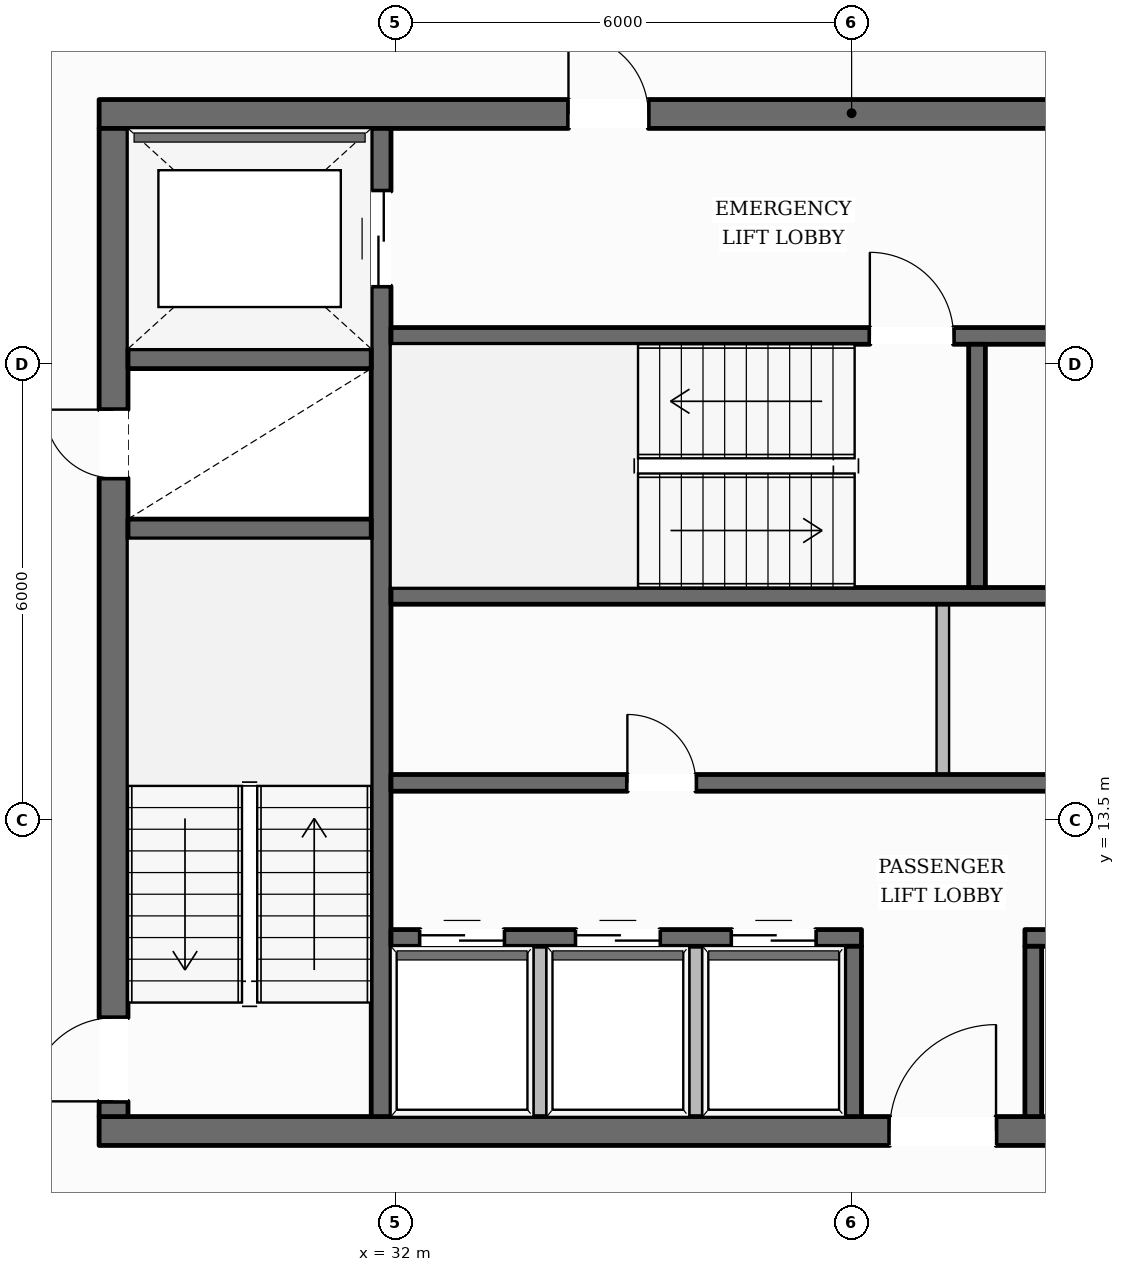
"""IFC4 building model, lengths in metres.
Left out: names, types, materials, properties, quantities, classifications, styles, units other than length and angle.
Written with IfcOpenShell. Run it as: python <this file> out.ifc"""

import sys

from ifc_helpers import new_model, si_unit, direction, frame, frame_2d, origin, place, context, subcontext, project, spatial, rectangle, extrude, element, fill, save


model = new_model("IFC4")
c1 = context("Model", 3, precision=1e-05, world=origin(), true_north=direction((0.0, 1.0)))
c2 = subcontext(c1, "Body", "Model", "MODEL_VIEW")
j1 = project(units=[si_unit("LENGTHUNIT", "METRE"), si_unit("PLANEANGLEUNIT", "RADIAN")], contexts=[c1])
p1 = place(None, origin())
s1 = spatial("IfcSite", under=j1, at=p1, CompositionType="ELEMENT")
p2 = place(p1, origin())
s2 = spatial("IfcBuilding", under=s1, at=p2, CompositionType="ELEMENT")
p3 = place(p2, frame((0.0, 0.0, 258.75)))
s3 = spatial("IfcBuildingStorey", under=s2, at=p3, CompositionType="ELEMENT", Elevation=258.75)
p4 = place(p3, frame((28.1, 9.41, 0.0), z_axis=(0.0, 0.0, 1.0), x_axis=(1.0, 0.0, 0.0)))
e1 = element("IfcWall", 1, at=p4, inside=s3, PredefinedType="SOLIDWALL", context=c2, shape_type="SweptSolid", body=[
    extrude(rectangle(XDim=19.8, YDim=0.38, at=frame_2d((9.9, 0.0))), origin(), (0.0, 0.0, 1.0), 3.61),
])
p5 = place(p4, frame((10.4, 0.0, 0.0)))
e2 = element("IfcOpeningElement", 2, at=p5, cuts=e1, PredefinedType="OPENING", context=c2, shape_type="SweptSolid", body=[
    extrude(rectangle(XDim=1.4, YDim=2.2, at=frame_2d((0.7, 1.1))), frame((0.0, 0.2, 0.0), z_axis=(0.0, -1.0, 0.0), x_axis=(1.0, 0.0, 0.0)), (0.0, 0.0, 1.0), 0.4),
])
p6 = place(p3, frame((28.1, 22.79, 0.0), z_axis=(0.0, 0.0, 1.0), x_axis=(1.0, 0.0, 0.0)))
e3 = element("IfcWall", 3, at=p6, inside=s3, PredefinedType="SOLIDWALL", context=c2, shape_type="SweptSolid", body=[
    extrude(rectangle(XDim=19.8, YDim=0.38, at=frame_2d((9.9, 0.0))), origin(), (0.0, 0.0, 1.0), 3.61),
])
p7 = place(p6, frame((6.175, 0.0, 0.0)))
e4 = element("IfcOpeningElement", 4, at=p7, cuts=e3, PredefinedType="OPENING", context=c2, shape_type="SweptSolid", body=[
    extrude(rectangle(XDim=1.05, YDim=2.15, at=frame_2d((0.525, 1.075))), frame((0.0, 0.2, 0.0), z_axis=(0.0, -1.0, 0.0), x_axis=(1.0, 0.0, 0.0)), (0.0, 0.0, 1.0), 0.4),
])
p8 = place(p6, frame((12.575, 0.0, 0.0)))
e5 = element("IfcOpeningElement", 5, at=p8, cuts=e3, PredefinedType="OPENING", context=c2, shape_type="SweptSolid", body=[
    extrude(rectangle(XDim=1.05, YDim=2.15, at=frame_2d((0.525, 1.075))), frame((0.0, 0.2, 0.0), z_axis=(0.0, -1.0, 0.0), x_axis=(1.0, 0.0, 0.0)), (0.0, 0.0, 1.0), 0.4),
])
p9 = place(p3, frame((28.29, 9.6, 0.0), z_axis=(0.0, 0.0, 1.0), x_axis=(0.0, 1.0, 0.0)))
e6 = element("IfcWall", 6, at=p9, inside=s3, PredefinedType="SOLIDWALL", context=c2, shape_type="SweptSolid", body=[
    extrude(rectangle(XDim=13.0, YDim=0.38, at=frame_2d((6.5, 0.0))), origin(), (0.0, 0.0, 1.0), 3.61),
])
p10 = place(p9, frame((0.2, 0.0, 0.0)))
e7 = element("IfcOpeningElement", 7, at=p10, cuts=e6, PredefinedType="OPENING", context=c2, shape_type="SweptSolid", body=[
    extrude(rectangle(XDim=1.1, YDim=2.15, at=frame_2d((0.55, 1.075))), frame((0.0, 0.2, 0.0), z_axis=(0.0, -1.0, 0.0), x_axis=(1.0, 0.0, 0.0)), (0.0, 0.0, 1.0), 0.4),
])
p11 = place(p9, frame((8.4, 0.0, 0.0)))
e8 = element("IfcOpeningElement", 8, at=p11, cuts=e6, PredefinedType="OPENING", context=c2, shape_type="SweptSolid", body=[
    extrude(rectangle(XDim=0.9, YDim=2.1, at=frame_2d((0.45, 1.05))), frame((0.0, 0.2, 0.0), z_axis=(0.0, -1.0, 0.0), x_axis=(1.0, 0.0, 0.0)), (0.0, 0.0, 1.0), 0.4),
])
p12 = place(p3, frame((31.81, 9.6, 0.0), z_axis=(0.0, 0.0, 1.0), x_axis=(0.0, 1.0, 0.0)))
e9 = element("IfcWall", 9, at=p12, inside=s3, PredefinedType="SHEAR", context=c2, shape_type="SweptSolid", body=[
    extrude(rectangle(XDim=13.0, YDim=0.26, at=frame_2d((6.5, 0.0))), origin(), (0.0, 0.0, 1.0), 3.61),
])
p13 = place(p12, frame((10.925, 0.0, 0.0)))
e10 = element("IfcOpeningElement", 10, at=p13, cuts=e9, PredefinedType="OPENING", context=c2, shape_type="SweptSolid", body=[
    extrude(rectangle(XDim=1.25, YDim=2.25, at=frame_2d((0.625, 1.125))), frame((0.0, 0.14, 0.0), z_axis=(0.0, -1.0, 0.0), x_axis=(1.0, 0.0, 0.0)), (0.0, 0.0, 1.0), 0.28),
])
for number, where, z_axis, x_axis in (
    (11, (28.48, 17.33, 0.0), (0.0, 0.0, 1.0), (1.0, 0.0, 0.0)),
    (12, (28.48, 19.57, 0.0), (0.0, 0.0, 1.0), (1.0, 0.0, 0.0)),
):
    element("IfcWall", number, at=place(p3, frame(where, z_axis=z_axis, x_axis=x_axis)), inside=s3, PredefinedType="SHEAR", context=c2, shape_type="SweptSolid", body=[
        extrude(rectangle(XDim=3.2, YDim=0.26, at=frame_2d((1.6, 0.0))), origin(), (0.0, 0.0, 1.0), 3.61),
    ])
p14 = place(p3, frame((31.94, 19.87, 0.0), z_axis=(0.0, 0.0, 1.0), x_axis=(1.0, 0.0, 0.0)))
e13 = element("IfcWall", 13, at=p14, inside=s3, PredefinedType="SOLIDWALL", context=c2, shape_type="SweptSolid", body=[
    extrude(rectangle(XDim=12.12, YDim=0.22, at=frame_2d((6.06, 0.0))), origin(), (0.0, 0.0, 1.0), 3.61),
])
p15 = place(p14, frame((6.3, 0.0, 0.0)))
e14 = element("IfcOpeningElement", 14, at=p15, cuts=e13, PredefinedType="OPENING", context=c2, shape_type="SweptSolid", body=[
    extrude(rectangle(XDim=1.1, YDim=2.15, at=frame_2d((0.55, 1.075))), frame((0.0, 0.12, 0.0), z_axis=(0.0, -1.0, 0.0), x_axis=(1.0, 0.0, 0.0)), (0.0, 0.0, 1.0), 0.24),
])
p16 = place(p14, frame((9.51, 0.0, 0.0)))
e15 = element("IfcOpeningElement", 15, at=p16, cuts=e13, PredefinedType="OPENING", context=c2, shape_type="SweptSolid", body=[
    extrude(rectangle(XDim=0.9, YDim=2.1, at=frame_2d((0.45, 1.05))), frame((0.0, 0.12, 0.0), z_axis=(0.0, -1.0, 0.0), x_axis=(1.0, 0.0, 0.0)), (0.0, 0.0, 1.0), 0.24),
])
p17 = place(p3, frame((31.94, 16.45, 0.0), z_axis=(0.0, 0.0, 1.0), x_axis=(1.0, 0.0, 0.0)))
e16 = element("IfcWall", 16, at=p17, inside=s3, PredefinedType="SOLIDWALL", context=c2, shape_type="SweptSolid", body=[
    extrude(rectangle(XDim=12.12, YDim=0.22, at=frame_2d((6.06, 0.0))), origin(), (0.0, 0.0, 1.0), 3.61),
])
p18 = place(p3, frame((39.65, 16.56, 0.0), z_axis=(0.0, 0.0, 1.0), x_axis=(0.0, 1.0, 0.0)))
e17 = element("IfcWall", 17, at=p18, inside=s3, PredefinedType="SOLIDWALL", context=c2, shape_type="SweptSolid", body=[
    extrude(rectangle(XDim=3.2, YDim=0.22, at=frame_2d((1.6, 0.0))), origin(), (0.0, 0.0, 1.0), 3.61),
])
p19 = place(p3, frame((31.94, 13.99, 0.0), z_axis=(0.0, 0.0, 1.0), x_axis=(1.0, 0.0, 0.0)))
e18 = element("IfcWall", 18, at=p19, inside=s3, PredefinedType="SOLIDWALL", context=c2, shape_type="SweptSolid", body=[
    extrude(rectangle(XDim=12.12, YDim=0.22, at=frame_2d((6.06, 0.0))), origin(), (0.0, 0.0, 1.0), 3.61),
])
p20 = place(p19, frame((3.11, 0.0, 0.0)))
e19 = element("IfcOpeningElement", 19, at=p20, cuts=e18, PredefinedType="OPENING", context=c2, shape_type="SweptSolid", body=[
    extrude(rectangle(XDim=0.9, YDim=2.1, at=frame_2d((0.45, 1.05))), frame((0.0, 0.12, 0.0), z_axis=(0.0, -1.0, 0.0), x_axis=(1.0, 0.0, 0.0)), (0.0, 0.0, 1.0), 0.24),
])
p21 = place(p19, frame((9.21, 0.0, 0.0)))
e20 = element("IfcOpeningElement", 20, at=p21, cuts=e18, PredefinedType="OPENING", context=c2, shape_type="SweptSolid", body=[
    extrude(rectangle(XDim=0.9, YDim=2.1, at=frame_2d((0.45, 1.05))), frame((0.0, 0.12, 0.0), z_axis=(0.0, -1.0, 0.0), x_axis=(1.0, 0.0, 0.0)), (0.0, 0.0, 1.0), 0.24),
])
p22 = place(p3, frame((31.94, 11.95, 0.0), z_axis=(0.0, 0.0, 1.0), x_axis=(1.0, 0.0, 0.0)))
e21 = element("IfcWall", 21, at=p22, inside=s3, PredefinedType="SOLIDWALL", context=c2, shape_type="SweptSolid", body=[
    extrude(rectangle(XDim=6.19, YDim=0.22, at=frame_2d((3.095, 0.0))), origin(), (0.0, 0.0, 1.0), 3.61),
])
p23 = place(p22, frame((0.385, 0.0, 0.0)))
e22 = element("IfcOpeningElement", 22, at=p23, cuts=e21, PredefinedType="OPENING", context=c2, shape_type="SweptSolid", body=[
    extrude(rectangle(XDim=1.1, YDim=2.2, at=frame_2d((0.55, 1.1))), frame((0.0, 0.12, 0.0), z_axis=(0.0, -1.0, 0.0), x_axis=(1.0, 0.0, 0.0)), (0.0, 0.0, 1.0), 0.24),
])
p24 = place(p22, frame((2.435, 0.0, 0.0)))
e23 = element("IfcOpeningElement", 23, at=p24, cuts=e21, PredefinedType="OPENING", context=c2, shape_type="SweptSolid", body=[
    extrude(rectangle(XDim=1.1, YDim=2.2, at=frame_2d((0.55, 1.1))), frame((0.0, 0.12, 0.0), z_axis=(0.0, -1.0, 0.0), x_axis=(1.0, 0.0, 0.0)), (0.0, 0.0, 1.0), 0.24),
])
p25 = place(p22, frame((4.485, 0.0, 0.0)))
e24 = element("IfcOpeningElement", 24, at=p25, cuts=e21, PredefinedType="OPENING", context=c2, shape_type="SweptSolid", body=[
    extrude(rectangle(XDim=1.1, YDim=2.2, at=frame_2d((0.55, 1.1))), frame((0.0, 0.12, 0.0), z_axis=(0.0, -1.0, 0.0), x_axis=(1.0, 0.0, 0.0)), (0.0, 0.0, 1.0), 0.24),
])
p26 = place(p3, frame((40.28, 11.95, 0.0), z_axis=(0.0, 0.0, 1.0), x_axis=(1.0, 0.0, 0.0)))
e25 = element("IfcWall", 25, at=p26, inside=s3, PredefinedType="SOLIDWALL", context=c2, shape_type="SweptSolid", body=[
    extrude(rectangle(XDim=3.78, YDim=0.22, at=frame_2d((1.89, 0.0))), origin(), (0.0, 0.0, 1.0), 3.61),
])
p27 = place(p26, frame((0.62, 0.0, 0.0)))
e26 = element("IfcOpeningElement", 26, at=p27, cuts=e25, PredefinedType="OPENING", context=c2, shape_type="SweptSolid", body=[
    extrude(rectangle(XDim=0.9, YDim=2.1, at=frame_2d((0.45, 1.05))), frame((0.0, 0.12, 0.0), z_axis=(0.0, -1.0, 0.0), x_axis=(1.0, 0.0, 0.0)), (0.0, 0.0, 1.0), 0.24),
])
p28 = place(p26, frame((2.47, 0.0, 0.0)))
e27 = element("IfcOpeningElement", 27, at=p28, cuts=e25, PredefinedType="OPENING", context=c2, shape_type="SweptSolid", body=[
    extrude(rectangle(XDim=0.9, YDim=2.1, at=frame_2d((0.45, 1.05))), frame((0.0, 0.12, 0.0), z_axis=(0.0, -1.0, 0.0), x_axis=(1.0, 0.0, 0.0)), (0.0, 0.0, 1.0), 0.24),
])
for number, where, z_axis, x_axis in (
    (28, (38.02, 9.6, 0.0), (0.0, 0.0, 1.0), (0.0, 1.0, 0.0)),
    (29, (40.39, 9.6, 0.0), (0.0, 0.0, 1.0), (0.0, 1.0, 0.0)),
):
    element("IfcWall", number, at=place(p3, frame(where, z_axis=z_axis, x_axis=x_axis)), inside=s3, PredefinedType="SOLIDWALL", context=c2, shape_type="SweptSolid", body=[
        extrude(rectangle(XDim=2.24, YDim=0.22, at=frame_2d((1.12, 0.0))), origin(), (0.0, 0.0, 1.0), 3.61),
    ])
p29 = place(p3, frame((16.214, 11.135, 0.0), z_axis=(0.0, 0.0, 1.0), x_axis=(0.49510347201, 0.868834018673, 0.0)))
e30 = element("IfcWall", 30, at=p29, inside=s3, PredefinedType="STANDARD", context=c2, shape_type="SweptSolid", body=[
    extrude(rectangle(XDim=37.643, YDim=0.35, at=frame_2d((18.822, 0.0))), origin(), (0.0, 0.0, 1.0), 3.196),
])
p30 = place(p29, frame((33.429, 0.0, 0.65)))
e31 = element("IfcOpeningElement", 31, at=p30, cuts=e30, PredefinedType="OPENING", context=c2, shape_type="SweptSolid", body=[
    extrude(rectangle(XDim=1.35, YDim=1.75, at=frame_2d((0.675, 0.875))), frame((0.0, 0.185, 0.0), z_axis=(0.0, -1.0, 0.0), x_axis=(1.0, 0.0, 0.0)), (0.0, 0.0, 1.0), 0.37),
])
p31 = place(p29, frame((27.315, 0.0, 0.65)))
e32 = element("IfcOpeningElement", 32, at=p31, cuts=e30, PredefinedType="OPENING", context=c2, shape_type="SweptSolid", body=[
    extrude(rectangle(XDim=1.35, YDim=1.75, at=frame_2d((0.675, 0.875))), frame((0.0, 0.185, 0.0), z_axis=(0.0, -1.0, 0.0), x_axis=(1.0, 0.0, 0.0)), (0.0, 0.0, 1.0), 0.37),
])
p32 = place(p29, frame((15.087, 0.0, 0.65)))
e33 = element("IfcOpeningElement", 33, at=p32, cuts=e30, PredefinedType="OPENING", context=c2, shape_type="SweptSolid", body=[
    extrude(rectangle(XDim=1.35, YDim=1.75, at=frame_2d((0.675, 0.875))), frame((0.0, 0.185, 0.0), z_axis=(0.0, -1.0, 0.0), x_axis=(1.0, 0.0, 0.0)), (0.0, 0.0, 1.0), 0.37),
])
p33 = place(p29, frame((8.973, 0.0, 0.65)))
e34 = element("IfcOpeningElement", 34, at=p33, cuts=e30, PredefinedType="OPENING", context=c2, shape_type="SweptSolid", body=[
    extrude(rectangle(XDim=1.35, YDim=1.75, at=frame_2d((0.675, 0.875))), frame((0.0, 0.185, 0.0), z_axis=(0.0, -1.0, 0.0), x_axis=(1.0, 0.0, 0.0)), (0.0, 0.0, 1.0), 0.37),
])
p34 = place(p29, frame((2.859, 0.0, 0.65)))
e35 = element("IfcOpeningElement", 35, at=p34, cuts=e30, PredefinedType="OPENING", context=c2, shape_type="SweptSolid", body=[
    extrude(rectangle(XDim=1.35, YDim=1.75, at=frame_2d((0.675, 0.875))), frame((0.0, 0.185, 0.0), z_axis=(0.0, -1.0, 0.0), x_axis=(1.0, 0.0, 0.0)), (0.0, 0.0, 1.0), 0.37),
])
for number, where, z_axis, x_axis in (
    (36, (33.9, 9.49, 0.0), (0.0, 0.0, 1.0), (0.0, 1.0, 0.0)),
    (37, (35.95, 9.49, 0.0), (0.0, 0.0, 1.0), (0.0, 1.0, 0.0)),
):
    element("IfcWall", number, at=place(p3, frame(where, z_axis=z_axis, x_axis=x_axis)), inside=s3, PredefinedType="PARTITIONING", context=c2, shape_type="SweptSolid", body=[
        extrude(rectangle(XDim=2.35, YDim=0.165, at=frame_2d((1.175, 0.0))), origin(), (0.0, 0.0, 1.0), 3.61),
    ])
p35 = place(p3, frame((39.2, 14.1, 0.0), z_axis=(0.0, 0.0, 1.0), x_axis=(0.0, 1.0, 0.0)))
e38 = element("IfcWall", 38, at=p35, inside=s3, PredefinedType="PARTITIONING", context=c2, shape_type="SweptSolid", body=[
    extrude(rectangle(XDim=2.24, YDim=0.165, at=frame_2d((1.12, 0.0))), origin(), (0.0, 0.0, 1.0), 3.61),
])
p36 = place(p10, origin())
e39 = element("IfcDoor", 39, at=p36, inside=s3, OperationType="SINGLE_SWING_LEFT", PredefinedType="DOOR", context=c2, shape_type="SweptSolid", body=[
    extrude(rectangle(XDim=1.1, YDim=2.15, at=frame_2d((0.55, 1.075))), frame((0.0, 0.025, 0.0), z_axis=(0.0, -1.0, 0.0), x_axis=(1.0, 0.0, 0.0)), (0.0, 0.0, 1.0), 0.05),
])
fill(e7, e39)
p37 = place(p15, origin())
e40 = element("IfcDoor", 40, at=p37, inside=s3, OperationType="SINGLE_SWING_LEFT", PredefinedType="DOOR", context=c2, shape_type="SweptSolid", body=[
    extrude(rectangle(XDim=1.1, YDim=2.15, at=frame_2d((0.55, 1.075))), frame((0.0, 0.025, 0.0), z_axis=(0.0, -1.0, 0.0), x_axis=(1.0, 0.0, 0.0)), (0.0, 0.0, 1.0), 0.05),
])
fill(e14, e40)
p38 = place(p11, origin())
e41 = element("IfcDoor", 41, at=p38, inside=s3, OperationType="SINGLE_SWING_RIGHT", PredefinedType="DOOR", context=c2, shape_type="SweptSolid", body=[
    extrude(rectangle(XDim=0.9, YDim=2.1, at=frame_2d((0.45, 1.05))), frame((0.0, 0.025, 0.0), z_axis=(0.0, -1.0, 0.0), x_axis=(1.0, 0.0, 0.0)), (0.0, 0.0, 1.0), 0.05),
])
fill(e8, e41)
p39 = place(p7, origin())
e42 = element("IfcDoor", 42, at=p39, inside=s3, OperationType="SINGLE_SWING_LEFT", PredefinedType="DOOR", context=c2, shape_type="SweptSolid", body=[
    extrude(rectangle(XDim=1.05, YDim=2.15, at=frame_2d((0.525, 1.075))), frame((0.0, 0.025, 0.0), z_axis=(0.0, -1.0, 0.0), x_axis=(1.0, 0.0, 0.0)), (0.0, 0.0, 1.0), 0.05),
])
fill(e4, e42)
p40 = place(p13, origin())
e43 = element("IfcDoor", 43, at=p40, inside=s3, OperationType="DOUBLE_DOOR_SLIDING", PredefinedType="DOOR", context=c2, shape_type="SweptSolid", body=[
    extrude(rectangle(XDim=1.25, YDim=2.25, at=frame_2d((0.625, 1.125))), frame((0.0, 0.025, 0.0), z_axis=(0.0, -1.0, 0.0), x_axis=(1.0, 0.0, 0.0)), (0.0, 0.0, 1.0), 0.05),
])
fill(e10, e43)
p41 = place(p5, origin())
e44 = element("IfcDoor", 44, at=p41, inside=s3, OperationType="SINGLE_SWING_RIGHT", PredefinedType="DOOR", context=c2, shape_type="SweptSolid", body=[
    extrude(rectangle(XDim=1.4, YDim=2.2, at=frame_2d((0.7, 1.1))), frame((0.0, 0.025, 0.0), z_axis=(0.0, -1.0, 0.0), x_axis=(1.0, 0.0, 0.0)), (0.0, 0.0, 1.0), 0.05),
])
fill(e2, e44)
p42 = place(p23, origin())
e45 = element("IfcDoor", 45, at=p42, inside=s3, OperationType="DOUBLE_DOOR_SLIDING", PredefinedType="DOOR", context=c2, shape_type="SweptSolid", body=[
    extrude(rectangle(XDim=1.1, YDim=2.2, at=frame_2d((0.55, 1.1))), frame((0.0, 0.025, 0.0), z_axis=(0.0, -1.0, 0.0), x_axis=(1.0, 0.0, 0.0)), (0.0, 0.0, 1.0), 0.05),
])
fill(e22, e45)
p43 = place(p24, origin())
e46 = element("IfcDoor", 46, at=p43, inside=s3, OperationType="DOUBLE_DOOR_SLIDING", PredefinedType="DOOR", context=c2, shape_type="SweptSolid", body=[
    extrude(rectangle(XDim=1.1, YDim=2.2, at=frame_2d((0.55, 1.1))), frame((0.0, 0.025, 0.0), z_axis=(0.0, -1.0, 0.0), x_axis=(1.0, 0.0, 0.0)), (0.0, 0.0, 1.0), 0.05),
])
fill(e23, e46)
p44 = place(p25, origin())
e47 = element("IfcDoor", 47, at=p44, inside=s3, OperationType="DOUBLE_DOOR_SLIDING", PredefinedType="DOOR", context=c2, shape_type="SweptSolid", body=[
    extrude(rectangle(XDim=1.1, YDim=2.2, at=frame_2d((0.55, 1.1))), frame((0.0, 0.025, 0.0), z_axis=(0.0, -1.0, 0.0), x_axis=(1.0, 0.0, 0.0)), (0.0, 0.0, 1.0), 0.05),
])
fill(e24, e47)
p45 = place(p20, origin())
e48 = element("IfcDoor", 48, at=p45, inside=s3, OperationType="SINGLE_SWING_LEFT", PredefinedType="DOOR", context=c2, shape_type="SweptSolid", body=[
    extrude(rectangle(XDim=0.9, YDim=2.1, at=frame_2d((0.45, 1.05))), frame((0.0, 0.025, 0.0), z_axis=(0.0, -1.0, 0.0), x_axis=(1.0, 0.0, 0.0)), (0.0, 0.0, 1.0), 0.05),
])
fill(e19, e48)
save(model, sys.argv[1])
